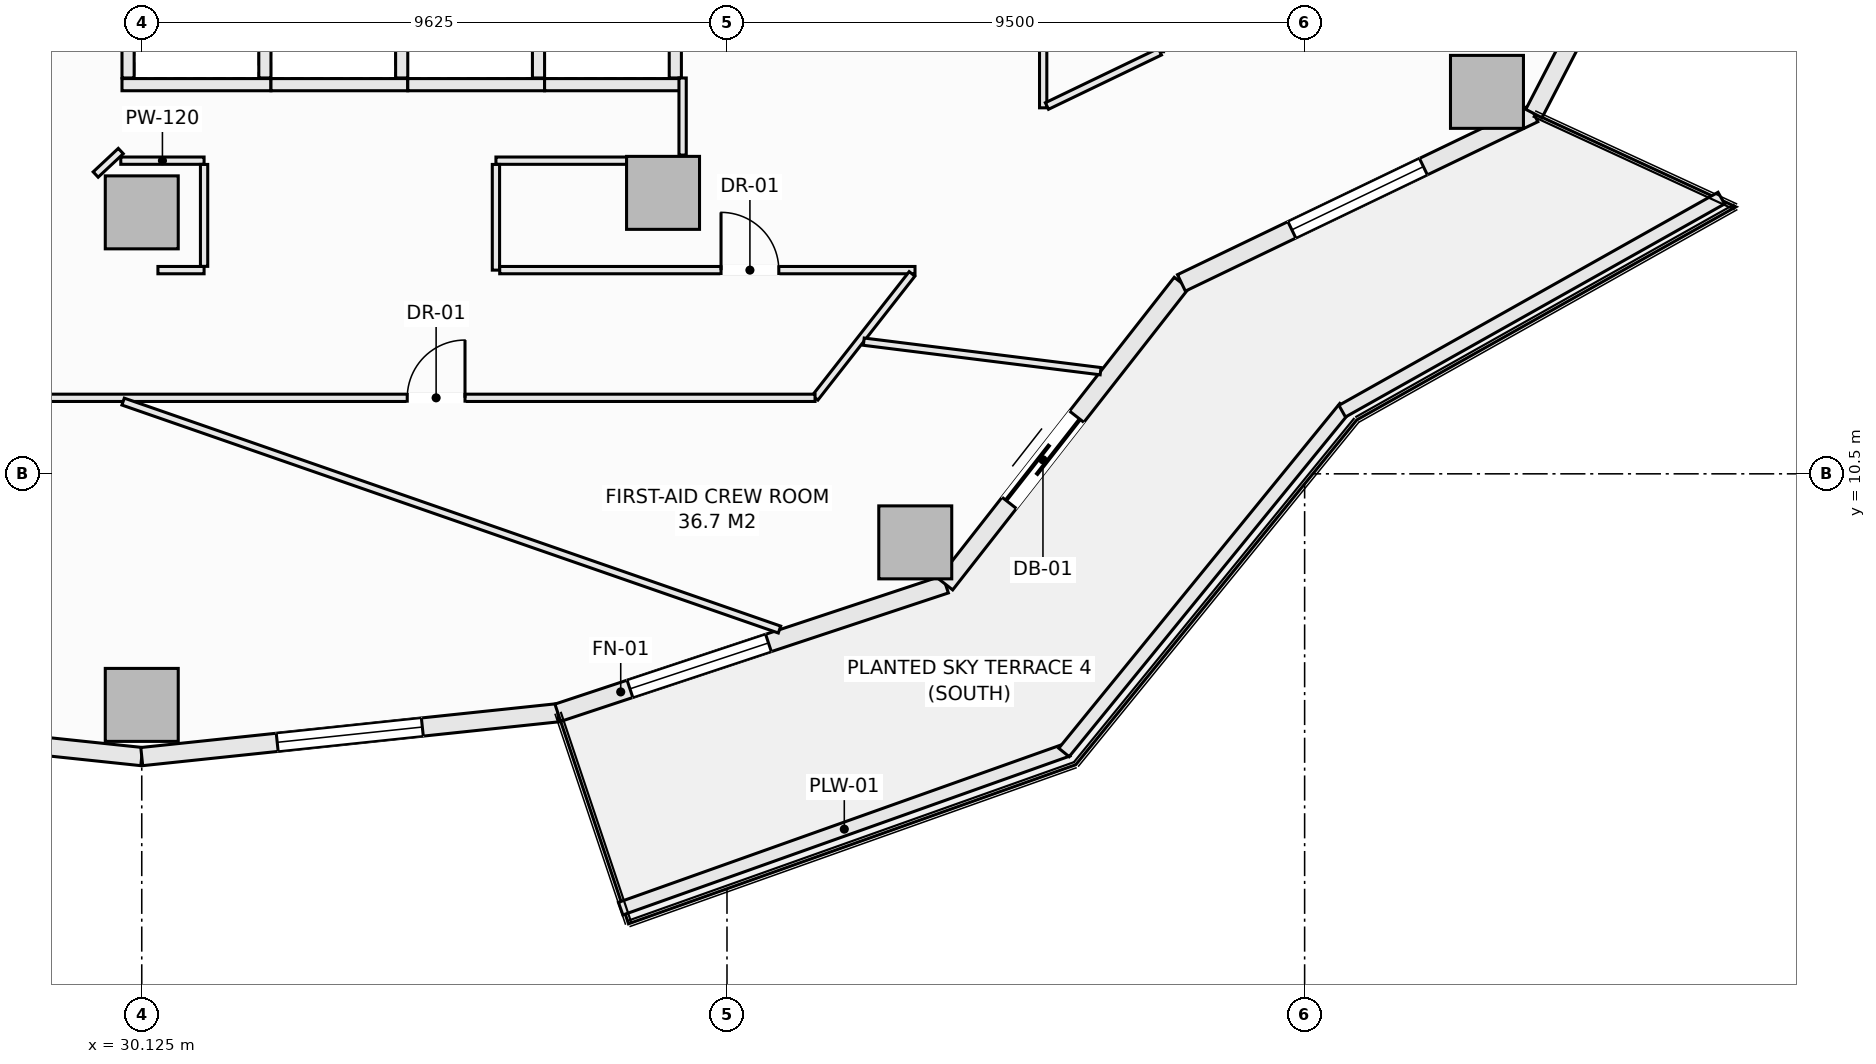
"""IFC4 building model, lengths in metres.
Left out: names, types, materials, properties, quantities, classifications, styles, units other than length and angle.
Written with IfcOpenShell. Run it as: python <this file> out.ifc"""

import sys

from ifc_helpers import new_model, si_unit, direction, frame, frame_2d, origin, origin_2d, place, context, subcontext, project, spatial, rectangle, extrude, element, fill, save


model = new_model("IFC4")
c1 = context("Model", 3, precision=1e-05, world=origin(), true_north=direction((0.0, 1.0)))
c2 = subcontext(c1, "Body", "Model", "MODEL_VIEW")
j1 = project(units=[si_unit("LENGTHUNIT", "METRE"), si_unit("PLANEANGLEUNIT", "RADIAN")], contexts=[c1])
p1 = place(None, origin())
s1 = spatial("IfcSite", under=j1, at=p1, CompositionType="ELEMENT")
p2 = place(p1, origin())
s2 = spatial("IfcBuilding", under=s1, at=p2, CompositionType="ELEMENT")
p3 = place(p2, frame((0.0, 0.0, 84.25)))
s3 = spatial("IfcBuildingStorey", under=s2, at=p3, CompositionType="ELEMENT", Elevation=84.25)
for number, where, z_axis, x_axis in (
    (1, (30.125, 6.7, -0.28), (0.0, 0.0, 1.0), (1.0, 0.0, 0.0)),
    (2, (42.846, 9.373, -0.28), (0.0, 0.0, 1.0), (1.0, 0.0, 0.0)),
    (3, (52.249, 16.781, -0.28), (0.0, 0.0, 1.0), (1.0, 0.0, 0.0)),
    (4, (30.125, 14.8, -0.28), (0.0, 0.0, 1.0), (1.0, 0.0, 0.0)),
    (5, (38.698, 15.121, -0.28), (0.0, 0.0, 1.0), (1.0, 0.0, 0.0)),
):
    element("IfcColumn", number, at=place(p3, frame(where, z_axis=z_axis, x_axis=x_axis)), inside=s3, PredefinedType="COLUMN", context=c2, shape_type="SweptSolid", body=[
        extrude(rectangle(XDim=1.2, YDim=1.2, at=origin_2d()), origin(), (0.0, 0.0, 1.0), 3.85),
    ])
p4 = place(p3, frame((23.282, 6.571, 0.0), z_axis=(0.0, 0.0, 1.0), x_axis=(0.994498840295, -0.104747585419, 0.0)))
e6 = element("IfcWall", 6, at=p4, inside=s3, PredefinedType="SOLIDWALL", context=c2, shape_type="SweptSolid", body=[
    extrude(rectangle(XDim=6.88, YDim=0.3, at=frame_2d((3.44, 0.0))), origin(), (0.0, 0.0, 1.0), 3.093),
])
p5 = place(p4, frame((2.24, 0.0, 0.85)))
e7 = element("IfcOpeningElement", 7, at=p5, cuts=e6, PredefinedType="OPENING", context=c2, shape_type="SweptSolid", body=[
    extrude(rectangle(XDim=2.4, YDim=1.9, at=frame_2d((1.2, 0.95))), frame((0.0, 0.16, 0.0), z_axis=(0.0, -1.0, 0.0), x_axis=(1.0, 0.0, 0.0)), (0.0, 0.0, 1.0), 0.32),
])
p6 = place(p3, frame((30.125, 5.85, 0.0), z_axis=(0.0, 0.0, 1.0), x_axis=(0.994498840295, 0.104747585419, 0.0)))
e8 = element("IfcWall", 8, at=p6, inside=s3, PredefinedType="SOLIDWALL", context=c2, shape_type="SweptSolid", body=[
    extrude(rectangle(XDim=6.88, YDim=0.3, at=frame_2d((3.44, 0.0))), origin(), (0.0, 0.0, 1.0), 3.093),
])
p7 = place(p6, frame((2.24, 0.0, 0.85)))
e9 = element("IfcOpeningElement", 9, at=p7, cuts=e8, PredefinedType="OPENING", context=c2, shape_type="SweptSolid", body=[
    extrude(rectangle(XDim=2.4, YDim=1.9, at=frame_2d((1.2, 0.95))), frame((0.0, 0.16, 0.0), z_axis=(0.0, -1.0, 0.0), x_axis=(1.0, 0.0, 0.0)), (0.0, 0.0, 1.0), 0.32),
])
p8 = place(p3, frame((36.968, 6.571, 0.0), z_axis=(0.0, 0.0, 1.0), x_axis=(0.949245153629, 0.314537181127, 0.0)))
e10 = element("IfcWall", 10, at=p8, inside=s3, PredefinedType="SOLIDWALL", context=c2, shape_type="SweptSolid", body=[
    extrude(rectangle(XDim=6.717, YDim=0.3, at=frame_2d((3.358, 0.0))), origin(), (0.0, 0.0, 1.0), 3.093),
])
p9 = place(p8, frame((1.25, 0.0, 0.85)))
e11 = element("IfcOpeningElement", 11, at=p9, cuts=e10, PredefinedType="OPENING", context=c2, shape_type="SweptSolid", body=[
    extrude(rectangle(XDim=2.4, YDim=1.9, at=frame_2d((1.2, 0.95))), frame((0.0, 0.16, 0.0), z_axis=(0.0, -1.0, 0.0), x_axis=(1.0, 0.0, 0.0)), (0.0, 0.0, 1.0), 0.32),
])
p10 = place(p3, frame((43.344, 8.684, 0.0), z_axis=(0.0, 0.0, 1.0), x_axis=(0.616434798832, 0.78740595552, 0.0)))
e12 = element("IfcWall", 12, at=p10, inside=s3, PredefinedType="SOLIDWALL", context=c2, shape_type="SweptSolid", body=[
    extrude(rectangle(XDim=6.294, YDim=0.3, at=frame_2d((3.147, 0.0))), origin(), (0.0, 0.0, 1.0), 3.093),
])
p11 = place(p10, frame((1.7, 0.0, 0.0)))
e13 = element("IfcOpeningElement", 13, at=p11, cuts=e12, PredefinedType="OPENING", context=c2, shape_type="SweptSolid", body=[
    extrude(rectangle(XDim=1.8, YDim=2.25, at=frame_2d((0.9, 1.125))), frame((0.0, 0.16, 0.0), z_axis=(0.0, -1.0, 0.0), x_axis=(1.0, 0.0, 0.0)), (0.0, 0.0, 1.0), 0.32),
])
p12 = place(p3, frame((47.224, 13.64, 0.0), z_axis=(0.0, 0.0, 1.0), x_axis=(0.901354747727, 0.433081538224, 0.0)))
e14 = element("IfcWall", 14, at=p12, inside=s3, PredefinedType="SOLIDWALL", context=c2, shape_type="SweptSolid", body=[
    extrude(rectangle(XDim=6.431, YDim=0.3, at=frame_2d((3.215, 0.0))), origin(), (0.0, 0.0, 1.0), 3.093),
])
p13 = place(p12, frame((2.015, 0.0, 0.85)))
e15 = element("IfcOpeningElement", 15, at=p13, cuts=e14, PredefinedType="OPENING", context=c2, shape_type="SweptSolid", body=[
    extrude(rectangle(XDim=2.4, YDim=1.9, at=frame_2d((1.2, 0.95))), frame((0.0, 0.16, 0.0), z_axis=(0.0, -1.0, 0.0), x_axis=(1.0, 0.0, 0.0)), (0.0, 0.0, 1.0), 0.32),
])
p14 = place(p3, frame((53.021, 16.425, 0.0), z_axis=(0.0, 0.0, 1.0), x_axis=(0.459800981414, 0.888021991558, 0.0)))
e16 = element("IfcWall", 16, at=p14, inside=s3, PredefinedType="SOLIDWALL", context=c2, shape_type="SweptSolid", body=[
    extrude(rectangle(XDim=5.744, YDim=0.3, at=frame_2d((2.872, 0.0))), origin(), (0.0, 0.0, 1.0), 3.093),
])
p15 = place(p14, frame((1.672, 0.0, 0.85)))
e17 = element("IfcOpeningElement", 17, at=p15, cuts=e16, PredefinedType="OPENING", context=c2, shape_type="SweptSolid", body=[
    extrude(rectangle(XDim=2.4, YDim=1.9, at=frame_2d((1.2, 0.95))), frame((0.0, 0.16, 0.0), z_axis=(0.0, -1.0, 0.0), x_axis=(1.0, 0.0, 0.0)), (0.0, 0.0, 1.0), 0.32),
])
p16 = place(p3, frame((38.001, 3.349, 0.0), z_axis=(0.0, 0.0, 1.0), x_axis=(0.942203722205, 0.335040513764, 0.0)))
e18 = element("IfcWall", 18, at=p16, inside=s3, PredefinedType="PARAPET", context=c2, shape_type="SweptSolid", body=[
    extrude(rectangle(XDim=7.807, YDim=0.22, at=frame_2d((3.904, 0.0))), origin(), (0.0, 0.0, 1.0), 0.52),
])
p17 = place(p3, frame((45.292, 5.918, 0.0), z_axis=(0.0, 0.0, 1.0), x_axis=(0.631819273026, 0.775115737315, 0.0)))
e19 = element("IfcWall", 19, at=p17, inside=s3, PredefinedType="PARAPET", context=c2, shape_type="SweptSolid", body=[
    extrude(rectangle(XDim=7.316, YDim=0.22, at=frame_2d((3.658, 0.0))), origin(), (0.0, 0.0, 1.0), 0.52),
])
p18 = place(p3, frame((49.868, 11.531, 0.0), z_axis=(0.0, 0.0, 1.0), x_axis=(0.871775109335, 0.489906275468, 0.0)))
e20 = element("IfcWall", 20, at=p18, inside=s3, PredefinedType="PARAPET", context=c2, shape_type="SweptSolid", body=[
    extrude(rectangle(XDim=7.152, YDim=0.22, at=frame_2d((3.576, 0.0))), origin(), (0.0, 0.0, 1.0), 0.52),
])
p19 = place(p3, frame((29.8, 16.9, 0.0), z_axis=(0.0, 0.0, 1.0), x_axis=(1.0, 0.0, 0.0)))
e21 = element("IfcWall", 21, at=p19, inside=s3, PredefinedType="SOLIDWALL", context=c2, shape_type="SweptSolid", body=[
    extrude(rectangle(XDim=2.45, YDim=0.2, at=frame_2d((1.225, 0.0))), origin(), (0.0, 0.0, 1.0), 3.57),
])
for number, where, z_axis, x_axis in (
    (22, (29.9, 17.01, 0.0), (0.0, 0.0, 1.0), (0.0, 1.0, 0.0)),
    (23, (32.15, 17.01, 0.0), (0.0, 0.0, 1.0), (0.0, 1.0, 0.0)),
):
    element("IfcWall", number, at=place(p3, frame(where, z_axis=z_axis, x_axis=x_axis)), inside=s3, PredefinedType="SOLIDWALL", context=c2, shape_type="SweptSolid", body=[
        extrude(rectangle(XDim=2.43, YDim=0.2, at=frame_2d((1.215, 0.0))), origin(), (0.0, 0.0, 1.0), 3.57),
    ])
p20 = place(p3, frame((32.25, 16.9, 0.0), z_axis=(0.0, 0.0, 1.0), x_axis=(1.0, 0.0, 0.0)))
e24 = element("IfcWall", 24, at=p20, inside=s3, PredefinedType="SOLIDWALL", context=c2, shape_type="SweptSolid", body=[
    extrude(rectangle(XDim=2.25, YDim=0.2, at=frame_2d((1.125, 0.0))), origin(), (0.0, 0.0, 1.0), 3.57),
])
p21 = place(p3, frame((34.4, 17.01, 0.0), z_axis=(0.0, 0.0, 1.0), x_axis=(0.0, 1.0, 0.0)))
e25 = element("IfcWall", 25, at=p21, inside=s3, PredefinedType="SOLIDWALL", context=c2, shape_type="SweptSolid", body=[
    extrude(rectangle(XDim=2.43, YDim=0.2, at=frame_2d((1.215, 0.0))), origin(), (0.0, 0.0, 1.0), 3.57),
])
p22 = place(p3, frame((34.5, 16.9, 0.0), z_axis=(0.0, 0.0, 1.0), x_axis=(1.0, 0.0, 0.0)))
e26 = element("IfcWall", 26, at=p22, inside=s3, PredefinedType="SOLIDWALL", context=c2, shape_type="SweptSolid", body=[
    extrude(rectangle(XDim=2.25, YDim=0.2, at=frame_2d((1.125, 0.0))), origin(), (0.0, 0.0, 1.0), 3.57),
])
p23 = place(p3, frame((36.65, 17.01, 0.0), z_axis=(0.0, 0.0, 1.0), x_axis=(0.0, 1.0, 0.0)))
e27 = element("IfcWall", 27, at=p23, inside=s3, PredefinedType="SOLIDWALL", context=c2, shape_type="SweptSolid", body=[
    extrude(rectangle(XDim=2.43, YDim=0.2, at=frame_2d((1.215, 0.0))), origin(), (0.0, 0.0, 1.0), 3.57),
])
p24 = place(p3, frame((36.75, 16.9, 0.0), z_axis=(0.0, 0.0, 1.0), x_axis=(1.0, 0.0, 0.0)))
e28 = element("IfcWall", 28, at=p24, inside=s3, PredefinedType="SOLIDWALL", context=c2, shape_type="SweptSolid", body=[
    extrude(rectangle(XDim=2.25, YDim=0.2, at=frame_2d((1.125, 0.0))), origin(), (0.0, 0.0, 1.0), 3.57),
])
p25 = place(p3, frame((38.9, 17.01, 0.0), z_axis=(0.0, 0.0, 1.0), x_axis=(0.0, 1.0, 0.0)))
e29 = element("IfcWall", 29, at=p25, inside=s3, PredefinedType="SOLIDWALL", context=c2, shape_type="SweptSolid", body=[
    extrude(rectangle(XDim=2.43, YDim=0.2, at=frame_2d((1.215, 0.0))), origin(), (0.0, 0.0, 1.0), 3.57),
])
p26 = place(p3, frame((29.78, 15.65, 0.0), z_axis=(0.0, 0.0, 1.0), x_axis=(1.0, 0.0, 0.0)))
e30 = element("IfcWall", 30, at=p26, inside=s3, PredefinedType="PARTITIONING", context=c2, shape_type="SweptSolid", body=[
    extrude(rectangle(XDim=1.37, YDim=0.12, at=frame_2d((0.685, 0.0))), origin(), (0.0, 0.0, 1.0), 3.57),
])
p27 = place(p3, frame((35.95, 15.65, 0.0), z_axis=(0.0, 0.0, 1.0), x_axis=(1.0, 0.0, 0.0)))
e31 = element("IfcWall", 31, at=p27, inside=s3, PredefinedType="PARTITIONING", context=c2, shape_type="SweptSolid", body=[
    extrude(rectangle(XDim=2.291, YDim=0.12, at=frame_2d((1.146, 0.0))), origin(), (0.0, 0.0, 1.0), 3.57),
])
p28 = place(p3, frame((35.95, 13.85, 0.0), z_axis=(0.0, 0.0, 1.0), x_axis=(0.0, 1.0, 0.0)))
e32 = element("IfcWall", 32, at=p28, inside=s3, PredefinedType="PARTITIONING", context=c2, shape_type="SweptSolid", body=[
    extrude(rectangle(XDim=1.738, YDim=0.12, at=frame_2d((0.869, 0.0))), origin(), (0.0, 0.0, 1.0), 3.57),
])
p29 = place(p3, frame((30.391, 13.85, 0.0), z_axis=(0.0, 0.0, 1.0), x_axis=(1.0, 0.0, 0.0)))
e33 = element("IfcWall", 33, at=p29, inside=s3, PredefinedType="PARTITIONING", context=c2, shape_type="SweptSolid", body=[
    extrude(rectangle(XDim=0.759, YDim=0.12, at=frame_2d((0.379, 0.0))), origin(), (0.0, 0.0, 1.0), 3.57),
])
p30 = place(p3, frame((36.012, 13.85, 0.0), z_axis=(0.0, 0.0, 1.0), x_axis=(1.0, 0.0, 0.0)))
e34 = element("IfcWall", 34, at=p30, inside=s3, PredefinedType="PARTITIONING", context=c2, shape_type="SweptSolid", body=[
    extrude(rectangle(XDim=6.83, YDim=0.12, at=frame_2d((3.415, 0.0))), origin(), (0.0, 0.0, 1.0), 3.57),
])
p31 = place(p30, frame((3.64, 0.0, 0.0)))
e35 = element("IfcOpeningElement", 35, at=p31, cuts=e34, PredefinedType="OPENING", context=c2, shape_type="SweptSolid", body=[
    extrude(rectangle(XDim=0.95, YDim=2.1, at=frame_2d((0.475, 1.05))), frame((0.0, 0.07, 0.0), z_axis=(0.0, -1.0, 0.0), x_axis=(1.0, 0.0, 0.0)), (0.0, 0.0, 1.0), 0.14),
])
p32 = place(p3, frame((41.198, 11.75, 0.0), z_axis=(0.0, 0.0, 1.0), x_axis=(0.616412533256, 0.787423386016, 0.0)))
e36 = element("IfcWall", 36, at=p32, inside=s3, PredefinedType="PARTITIONING", context=c2, shape_type="SweptSolid", body=[
    extrude(rectangle(XDim=2.588, YDim=0.12, at=frame_2d((1.294, 0.0))), origin(), (0.0, 0.0, 1.0), 3.57),
])
p33 = place(p3, frame((23.4, 11.75, 0.0), z_axis=(0.0, 0.0, 1.0), x_axis=(1.0, 0.0, 0.0)))
e37 = element("IfcWall", 37, at=p33, inside=s3, PredefinedType="PARTITIONING", context=c2, shape_type="SweptSolid", body=[
    extrude(rectangle(XDim=17.798, YDim=0.12, at=frame_2d((8.899, 0.0))), origin(), (0.0, 0.0, 1.0), 3.57),
])
p34 = place(p33, frame((3.094, 0.0, 0.0)))
e38 = element("IfcOpeningElement", 38, at=p34, cuts=e37, PredefinedType="OPENING", context=c2, shape_type="SweptSolid", body=[
    extrude(rectangle(XDim=0.95, YDim=2.1, at=frame_2d((0.475, 1.05))), frame((0.0, 0.07, 0.0), z_axis=(0.0, -1.0, 0.0), x_axis=(1.0, 0.0, 0.0)), (0.0, 0.0, 1.0), 0.14),
])
p35 = place(p33, frame((11.091, 0.0, 0.0)))
e39 = element("IfcOpeningElement", 39, at=p35, cuts=e37, PredefinedType="OPENING", context=c2, shape_type="SweptSolid", body=[
    extrude(rectangle(XDim=0.95, YDim=2.1, at=frame_2d((0.475, 1.05))), frame((0.0, 0.07, 0.0), z_axis=(0.0, -1.0, 0.0), x_axis=(1.0, 0.0, 0.0)), (0.0, 0.0, 1.0), 0.14),
])
p36 = place(p3, frame((44.95, 16.519, 0.0), z_axis=(0.0, 0.0, 1.0), x_axis=(0.0, 1.0, 0.0)))
e40 = element("IfcWall", 40, at=p36, inside=s3, PredefinedType="PARTITIONING", context=c2, shape_type="SweptSolid", body=[
    extrude(rectangle(XDim=6.501, YDim=0.12, at=frame_2d((3.25, 0.0))), origin(), (0.0, 0.0, 1.0), 3.57),
])
p37 = place(p3, frame((45.012, 16.549, 0.0), z_axis=(0.0, 0.0, 1.0), x_axis=(0.901304887575, 0.433185294803, 0.0)))
e41 = element("IfcWall", 41, at=p37, inside=s3, PredefinedType="PARTITIONING", context=c2, shape_type="SweptSolid", body=[
    extrude(rectangle(XDim=2.062, YDim=0.12, at=frame_2d((1.031, 0.0))), origin(), (0.0, 0.0, 1.0), 3.57),
])
p38 = place(p3, frame((39.02, 15.742, 0.0), z_axis=(0.0, 0.0, 1.0), x_axis=(0.0, 1.0, 0.0)))
e42 = element("IfcWall", 42, at=p38, inside=s3, PredefinedType="PARTITIONING", context=c2, shape_type="SweptSolid", body=[
    extrude(rectangle(XDim=1.268, YDim=0.12, at=frame_2d((0.634, 0.0))), origin(), (0.0, 0.0, 1.0), 2.934),
])
p39 = place(p3, frame((29.367, 15.422, 0.0), z_axis=(0.0, 0.0, 1.0), x_axis=(0.730667420492, 0.682733564893, 0.0)))
e43 = element("IfcWall", 43, at=p39, inside=s3, PredefinedType="PARTITIONING", context=c2, shape_type="SweptSolid", body=[
    extrude(rectangle(XDim=0.565, YDim=0.12, at=frame_2d((0.283, 0.0))), origin(), (0.0, 0.0, 1.0), 3.57),
])
p40 = place(p3, frame((31.15, 13.912, 0.0), z_axis=(0.0, 0.0, 1.0), x_axis=(0.0, 1.0, 0.0)))
e44 = element("IfcWall", 44, at=p40, inside=s3, PredefinedType="PARTITIONING", context=c2, shape_type="SweptSolid", body=[
    extrude(rectangle(XDim=1.676, YDim=0.12, at=frame_2d((0.838, 0.0))), origin(), (0.0, 0.0, 1.0), 3.57),
])
p41 = place(p3, frame((42.0, 12.674, 0.0), z_axis=(0.0, 0.0, 1.0), x_axis=(0.992316110302, -0.123728481908, 0.0)))
e45 = element("IfcWall", 45, at=p41, inside=s3, PredefinedType="PARTITIONING", context=c2, shape_type="SweptSolid", body=[
    extrude(rectangle(XDim=3.925, YDim=0.12, at=frame_2d((1.962, 0.0))), origin(), (0.0, 0.0, 1.0), 3.57),
])
p42 = place(p3, frame((29.818, 11.688, 0.0), z_axis=(0.0, 0.0, 1.0), x_axis=(0.944668147769, -0.328027575961, 0.0)))
e46 = element("IfcWall", 46, at=p42, inside=s3, PredefinedType="PARTITIONING", context=c2, shape_type="SweptSolid", body=[
    extrude(rectangle(XDim=11.428, YDim=0.12, at=frame_2d((5.714, 0.0))), origin(), (0.0, 0.0, 1.0), 3.093),
])
p43 = place(p7, origin())
e47 = element("IfcWindow", 47, at=p43, inside=s3, PartitioningType="SINGLE_PANEL", PredefinedType="WINDOW", context=c2, shape_type="SweptSolid", body=[
    extrude(rectangle(XDim=2.4, YDim=1.9, at=frame_2d((1.2, 0.95))), frame((0.0, 0.03, 0.0), z_axis=(0.0, -1.0, 0.0), x_axis=(1.0, 0.0, 0.0)), (0.0, 0.0, 1.0), 0.06),
])
fill(e9, e47)
p44 = place(p9, origin())
e48 = element("IfcWindow", 48, at=p44, inside=s3, PartitioningType="SINGLE_PANEL", PredefinedType="WINDOW", context=c2, shape_type="SweptSolid", body=[
    extrude(rectangle(XDim=2.4, YDim=1.9, at=frame_2d((1.2, 0.95))), frame((0.0, 0.03, 0.0), z_axis=(0.0, -1.0, 0.0), x_axis=(1.0, 0.0, 0.0)), (0.0, 0.0, 1.0), 0.06),
])
fill(e11, e48)
p45 = place(p11, frame((1.8, 0.0, 0.0), z_axis=(0.0, 0.0, 1.0), x_axis=(-1.0, 0.0, 0.0)))
e49 = element("IfcDoor", 49, at=p45, inside=s3, OperationType="SLIDING_TO_LEFT", PredefinedType="DOOR", context=c2, shape_type="SweptSolid", body=[
    extrude(rectangle(XDim=1.8, YDim=2.25, at=frame_2d((0.9, 1.125))), frame((0.0, 0.025, 0.0), z_axis=(0.0, -1.0, 0.0), x_axis=(1.0, 0.0, 0.0)), (0.0, 0.0, 1.0), 0.05),
])
fill(e13, e49)
p46 = place(p13, origin())
e50 = element("IfcWindow", 50, at=p46, inside=s3, PartitioningType="SINGLE_PANEL", PredefinedType="WINDOW", context=c2, shape_type="SweptSolid", body=[
    extrude(rectangle(XDim=2.4, YDim=1.9, at=frame_2d((1.2, 0.95))), frame((0.0, 0.03, 0.0), z_axis=(0.0, -1.0, 0.0), x_axis=(1.0, 0.0, 0.0)), (0.0, 0.0, 1.0), 0.06),
])
fill(e15, e50)
p47 = place(p35, origin())
e51 = element("IfcDoor", 51, at=p47, inside=s3, OperationType="SINGLE_SWING_RIGHT", PredefinedType="DOOR", context=c2, shape_type="SweptSolid", body=[
    extrude(rectangle(XDim=0.95, YDim=2.1, at=frame_2d((0.475, 1.05))), frame((0.0, 0.025, 0.0), z_axis=(0.0, -1.0, 0.0), x_axis=(1.0, 0.0, 0.0)), (0.0, 0.0, 1.0), 0.05),
])
fill(e39, e51)
p48 = place(p31, origin())
e52 = element("IfcDoor", 52, at=p48, inside=s3, OperationType="SINGLE_SWING_LEFT", PredefinedType="DOOR", context=c2, shape_type="SweptSolid", body=[
    extrude(rectangle(XDim=0.95, YDim=2.1, at=frame_2d((0.475, 1.05))), frame((0.0, 0.025, 0.0), z_axis=(0.0, -1.0, 0.0), x_axis=(1.0, 0.0, 0.0)), (0.0, 0.0, 1.0), 0.05),
])
fill(e35, e52)
save(model, sys.argv[1])
